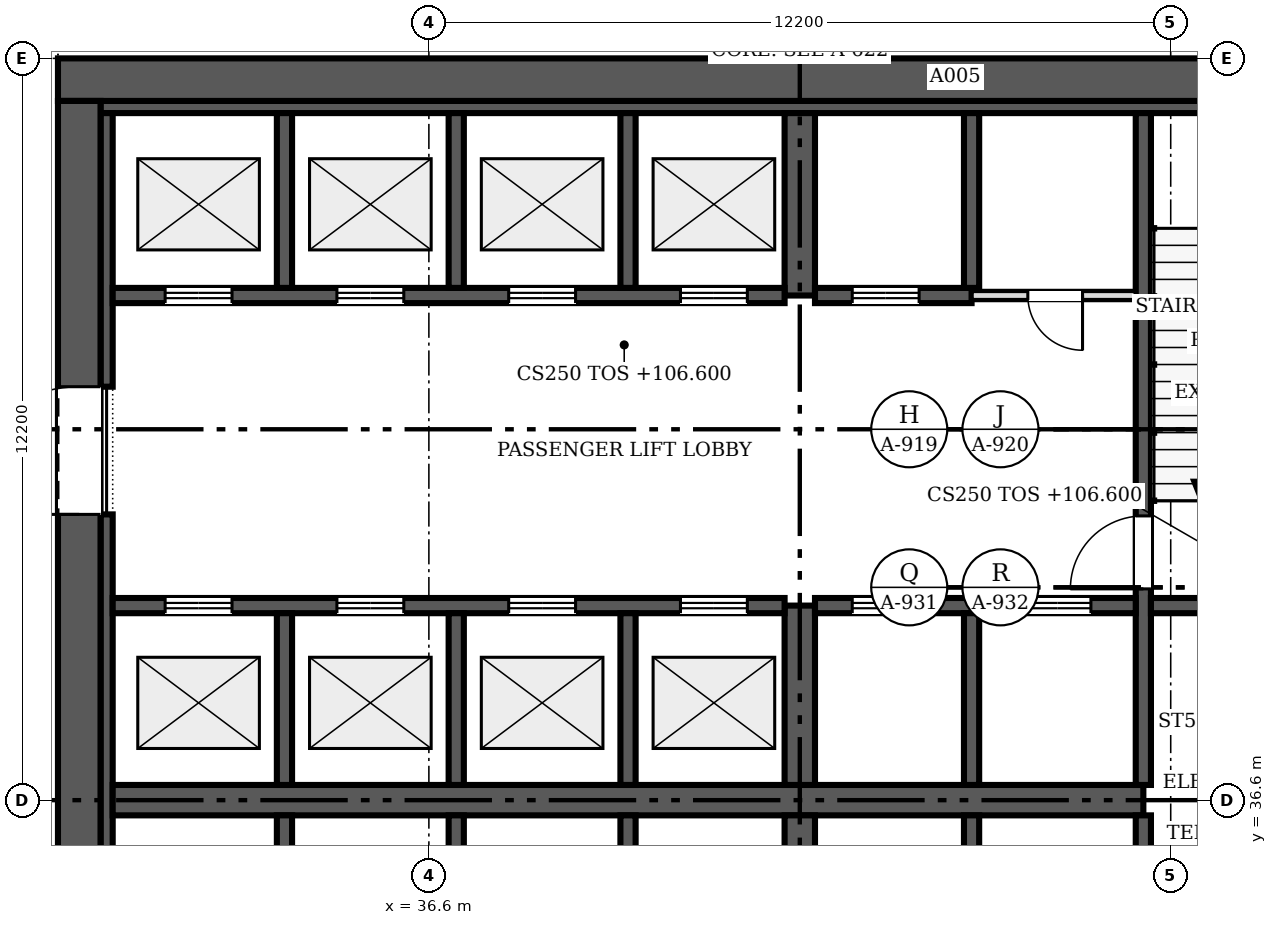
"""IFC4 building model, lengths in metres.
Left out: names, types, materials, properties, quantities, classifications, styles, units other than length and angle.
Written with IfcOpenShell. Run it as: python <this file> out.ifc"""

import sys

from ifc_helpers import new_model, si_unit, direction, frame, frame_2d, origin, place, context, subcontext, project, spatial, rectangle, extrude, source, transform, mapped, element, fill, save


model = new_model("IFC4")
c1 = context("Model", 3, precision=1e-05, world=origin(), true_north=direction((0.0, 1.0)))
c2 = subcontext(c1, "Body", "Model", "MODEL_VIEW")
j1 = project(units=[si_unit("LENGTHUNIT", "METRE"), si_unit("PLANEANGLEUNIT", "RADIAN")], contexts=[c1])
p1 = place(None, origin())
s1 = spatial("IfcSite", under=j1, at=p1, CompositionType="ELEMENT")
p2 = place(p1, origin())
s2 = spatial("IfcBuilding", under=s1, at=p2, CompositionType="ELEMENT")
p3 = place(p2, frame((0.0, 0.0, 106.6)))
s3 = spatial("IfcBuildingStorey", under=s2, at=p3, CompositionType="ELEMENT", Elevation=106.6)
p4 = place(p3, frame((30.85, 25.1, 0.0), z_axis=(0.0, 0.0, 1.0), x_axis=(0.0, 1.0, 0.0)))
e1 = element("IfcWall", 1, at=p4, inside=s3, PredefinedType="SHEAR", context=c2, shape_type="SweptSolid", body=[
    extrude(rectangle(XDim=23.0, YDim=0.7, at=frame_2d((11.5, 0.0))), origin(), (0.0, 0.0, 1.0), 6.0),
])
m1 = source(origin(), c2, "Body", "SweptSolid", [
    extrude(rectangle(XDim=2.1, YDim=2.4, at=frame_2d((1.05, 1.2))), frame((0.0, 0.36, 0.0), z_axis=(0.0, -1.0, 0.0), x_axis=(1.0, 0.0, 0.0)), (0.0, 0.0, 1.0), 0.72),
])
p5 = place(p4, frame((4.7, 0.0, 0.0)))
e2 = element("IfcOpeningElement", 2, at=p5, cuts=e1, PredefinedType="OPENING", context=c2, shape_type="MappedRepresentation", body=[
    mapped(m1, transform((0.0, 0.0, 0.0), scale=1.0)),
])
p6 = place(p4, frame((16.2, 0.0, 0.0)))
e3 = element("IfcOpeningElement", 3, at=p6, cuts=e1, PredefinedType="OPENING", context=c2, shape_type="MappedRepresentation", body=[
    mapped(m1, transform((0.0, 0.0, 0.0), scale=1.0)),
])
p7 = place(p3, frame((30.5, 48.45, 0.0), z_axis=(0.0, 0.0, 1.0), x_axis=(1.0, 0.0, 0.0)))
e4 = element("IfcWall", 4, at=p7, inside=s3, PredefinedType="SHEAR", context=c2, shape_type="SweptSolid", body=[
    extrude(rectangle(XDim=24.4, YDim=0.7, at=frame_2d((12.2, 0.0))), origin(), (0.0, 0.0, 1.0), 6.0),
])
p8 = place(p3, frame((31.2, 48.0, 0.0), z_axis=(0.0, 0.0, 1.0), x_axis=(1.0, 0.0, 0.0)))
e5 = element("IfcWall", 5, at=p8, inside=s3, PredefinedType="SOLIDWALL", context=c2, shape_type="SweptSolid", body=[
    extrude(rectangle(XDim=23.0, YDim=0.2, at=frame_2d((11.5, 0.0))), origin(), (0.0, 0.0, 1.0), 6.0),
])
p9 = place(p3, frame((31.3, 31.9, 0.0), z_axis=(0.0, 0.0, 1.0), x_axis=(0.0, 1.0, 0.0)))
e6 = element("IfcWall", 6, at=p9, inside=s3, PredefinedType="SOLIDWALL", context=c2, shape_type="SweptSolid", body=[
    extrude(rectangle(XDim=9.4, YDim=0.2, at=frame_2d((4.7, 0.0))), origin(), (0.0, 0.0, 1.0), 6.0),
])
p10 = place(p3, frame((31.3, 43.4, 0.0), z_axis=(0.0, 0.0, 1.0), x_axis=(0.0, 1.0, 0.0)))
e7 = element("IfcWall", 7, at=p10, inside=s3, PredefinedType="SOLIDWALL", context=c2, shape_type="SweptSolid", body=[
    extrude(rectangle(XDim=4.5, YDim=0.2, at=frame_2d((2.25, 0.0))), origin(), (0.0, 0.0, 1.0), 6.0),
])
p11 = place(p3, frame((31.4, 36.6, 0.0), z_axis=(0.0, 0.0, 1.0), x_axis=(1.0, 0.0, 0.0)))
e8 = element("IfcWall", 8, at=p11, inside=s3, PredefinedType="SHEAR", context=c2, shape_type="SweptSolid", body=[
    extrude(rectangle(XDim=16.95, YDim=0.5, at=frame_2d((8.475, 0.0))), origin(), (0.0, 0.0, 1.0), 6.0),
])
p12 = place(p3, frame((42.7, 36.35, 0.0), z_axis=(0.0, 0.0, 1.0), x_axis=(0.0, -1.0, 0.0)))
e9 = element("IfcWall", 9, at=p12, inside=s3, PredefinedType="SHEAR", context=c2, shape_type="SweptSolid", body=[
    extrude(rectangle(XDim=11.05, YDim=0.5, at=frame_2d((5.525, 0.0))), origin(), (0.0, 0.0, 1.0), 6.0),
])
m2 = source(origin(), c2, "Body", "SweptSolid", [
    extrude(rectangle(XDim=0.9, YDim=2.1, at=frame_2d((0.45, 1.05))), frame((0.0, 0.26, 0.0), z_axis=(0.0, -1.0, 0.0), x_axis=(1.0, 0.0, 0.0)), (0.0, 0.0, 1.0), 0.52),
])
p13 = place(p12, frame((6.5, 0.0, 0.0)))
e10 = element("IfcOpeningElement", 10, at=p13, cuts=e9, PredefinedType="OPENING", context=c2, shape_type="MappedRepresentation", body=[
    mapped(m2, transform((0.0, 0.0, 0.0), scale=1.0)),
])
m3 = source(origin(), c2, "Body", "SweptSolid", [
    extrude(rectangle(XDim=1.1, YDim=2.1, at=frame_2d((0.55, 1.05))), frame((0.0, 0.26, 0.0), z_axis=(0.0, -1.0, 0.0), x_axis=(1.0, 0.0, 0.0)), (0.0, 0.0, 1.0), 0.52),
])
p14 = place(p12, frame((3.8, 0.0, 0.0)))
e11 = element("IfcOpeningElement", 11, at=p14, cuts=e9, PredefinedType="OPENING", context=c2, shape_type="MappedRepresentation", body=[
    mapped(m3, transform((0.0, 0.0, 0.0), scale=1.0)),
])
p15 = place(p3, frame((42.7, 36.85, 0.0), z_axis=(0.0, 0.0, 1.0), x_axis=(0.0, 1.0, 0.0)))
e12 = element("IfcWall", 12, at=p15, inside=s3, PredefinedType="SHEAR", context=c2, shape_type="SweptSolid", body=[
    extrude(rectangle(XDim=2.95, YDim=0.5, at=frame_2d((1.475, 0.0))), origin(), (0.0, 0.0, 1.0), 6.0),
])
p16 = place(p3, frame((42.7, 44.9, 0.0), z_axis=(0.0, 0.0, 1.0), x_axis=(0.0, 1.0, 0.0)))
e13 = element("IfcWall", 13, at=p16, inside=s3, PredefinedType="SHEAR", context=c2, shape_type="SweptSolid", body=[
    extrude(rectangle(XDim=3.0, YDim=0.5, at=frame_2d((1.5, 0.0))), origin(), (0.0, 0.0, 1.0), 6.0),
])
p17 = place(p3, frame((48.35, 36.35, 0.0), z_axis=(0.0, 0.0, 1.0), x_axis=(0.0, -1.0, 0.0)))
e14 = element("IfcWall", 14, at=p17, inside=s3, PredefinedType="SOLIDWALL", context=c2, shape_type="SweptSolid", body=[
    extrude(rectangle(XDim=11.05, YDim=0.25, at=frame_2d((5.525, 0.0))), origin(), (0.0, 0.0, 1.0), 6.0),
])
m4 = source(origin(), c2, "Body", "SweptSolid", [
    extrude(rectangle(XDim=1.2, YDim=2.1, at=frame_2d((0.6, 1.05))), frame((0.0, 0.135, 0.0), z_axis=(0.0, -1.0, 0.0), x_axis=(1.0, 0.0, 0.0)), (0.0, 0.0, 1.0), 0.27),
])
p18 = place(p17, frame((3.225, 0.0, 0.0)))
e15 = element("IfcOpeningElement", 15, at=p18, cuts=e14, PredefinedType="OPENING", context=c2, shape_type="MappedRepresentation", body=[
    mapped(m4, transform((0.0, 0.0, 0.0), scale=1.0)),
])
p19 = place(p3, frame((48.35, 47.9, 0.0), z_axis=(0.0, 0.0, 1.0), x_axis=(0.0, -1.0, 0.0)))
e16 = element("IfcWall", 16, at=p19, inside=s3, PredefinedType="SOLIDWALL", context=c2, shape_type="SweptSolid", body=[
    extrude(rectangle(XDim=11.05, YDim=0.25, at=frame_2d((5.525, 0.0))), origin(), (0.0, 0.0, 1.0), 6.0),
])
p20 = place(p19, frame((6.625, 0.0, 0.0)))
e17 = element("IfcOpeningElement", 17, at=p20, cuts=e16, PredefinedType="OPENING", context=c2, shape_type="MappedRepresentation", body=[
    mapped(m4, transform((0.0, 0.0, 0.0), scale=1.0)),
])
p21 = place(p3, frame((31.4, 39.8, 0.0), z_axis=(0.0, 0.0, 1.0), x_axis=(1.0, 0.0, 0.0)))
e18 = element("IfcWall", 18, at=p21, inside=s3, PredefinedType="SOLIDWALL", context=c2, shape_type="SweptSolid", body=[
    extrude(rectangle(XDim=11.05, YDim=0.25, at=frame_2d((5.525, 0.0))), origin(), (0.0, 0.0, 1.0), 6.0),
])
m5 = source(origin(), c2, "Body", "SweptSolid", [
    extrude(rectangle(XDim=1.1, YDim=2.1, at=frame_2d((0.55, 1.05))), frame((0.0, 0.135, 0.0), z_axis=(0.0, -1.0, 0.0), x_axis=(1.0, 0.0, 0.0)), (0.0, 0.0, 1.0), 0.27),
])
p22 = place(p21, frame((0.863, 0.0, 0.0)))
e19 = element("IfcOpeningElement", 19, at=p22, cuts=e18, PredefinedType="OPENING", context=c2, shape_type="MappedRepresentation", body=[
    mapped(m5, transform((0.0, 0.0, 0.0), scale=1.0)),
])
p23 = place(p21, frame((3.688, 0.0, 0.0)))
e20 = element("IfcOpeningElement", 20, at=p23, cuts=e18, PredefinedType="OPENING", context=c2, shape_type="MappedRepresentation", body=[
    mapped(m5, transform((0.0, 0.0, 0.0), scale=1.0)),
])
p24 = place(p21, frame((6.512, 0.0, 0.0)))
e21 = element("IfcOpeningElement", 21, at=p24, cuts=e18, PredefinedType="OPENING", context=c2, shape_type="MappedRepresentation", body=[
    mapped(m5, transform((0.0, 0.0, 0.0), scale=1.0)),
])
p25 = place(p21, frame((9.337, 0.0, 0.0)))
e22 = element("IfcOpeningElement", 22, at=p25, cuts=e18, PredefinedType="OPENING", context=c2, shape_type="MappedRepresentation", body=[
    mapped(m5, transform((0.0, 0.0, 0.0), scale=1.0)),
])
p26 = place(p3, frame((42.95, 39.8, 0.0), z_axis=(0.0, 0.0, 1.0), x_axis=(1.0, 0.0, 0.0)))
e23 = element("IfcWall", 23, at=p26, inside=s3, PredefinedType="SOLIDWALL", context=c2, shape_type="SweptSolid", body=[
    extrude(rectangle(XDim=5.275, YDim=0.25, at=frame_2d((2.638, 0.0))), origin(), (0.0, 0.0, 1.0), 6.0),
])
p27 = place(p26, frame((0.613, 0.0, 0.0)))
e24 = element("IfcOpeningElement", 24, at=p27, cuts=e23, PredefinedType="OPENING", context=c2, shape_type="MappedRepresentation", body=[
    mapped(m5, transform((0.0, 0.0, 0.0), scale=1.0)),
])
p28 = place(p26, frame((3.438, 0.0, 0.0)))
e25 = element("IfcOpeningElement", 25, at=p28, cuts=e23, PredefinedType="OPENING", context=c2, shape_type="MappedRepresentation", body=[
    mapped(m5, transform((0.0, 0.0, 0.0), scale=1.0)),
])
p29 = place(p3, frame((48.475, 39.8, 0.0), z_axis=(0.0, 0.0, 1.0), x_axis=(1.0, 0.0, 0.0)))
e26 = element("IfcWall", 26, at=p29, inside=s3, PredefinedType="SOLIDWALL", context=c2, shape_type="SweptSolid", body=[
    extrude(rectangle(XDim=3.525, YDim=0.25, at=frame_2d((1.762, 0.0))), origin(), (0.0, 0.0, 1.0), 6.0),
])
p30 = place(p3, frame((42.45, 44.9, 0.0), z_axis=(0.0, 0.0, 1.0), x_axis=(-1.0, 0.0, 0.0)))
e27 = element("IfcWall", 27, at=p30, inside=s3, PredefinedType="SOLIDWALL", context=c2, shape_type="SweptSolid", body=[
    extrude(rectangle(XDim=11.05, YDim=0.25, at=frame_2d((5.525, 0.0))), origin(), (0.0, 0.0, 1.0), 6.0),
])
p31 = place(p30, frame((9.087, 0.0, 0.0)))
e28 = element("IfcOpeningElement", 28, at=p31, cuts=e27, PredefinedType="OPENING", context=c2, shape_type="MappedRepresentation", body=[
    mapped(m5, transform((0.0, 0.0, 0.0), scale=1.0)),
])
p32 = place(p30, frame((6.262, 0.0, 0.0)))
e29 = element("IfcOpeningElement", 29, at=p32, cuts=e27, PredefinedType="OPENING", context=c2, shape_type="MappedRepresentation", body=[
    mapped(m5, transform((0.0, 0.0, 0.0), scale=1.0)),
])
p33 = place(p30, frame((3.438, 0.0, 0.0)))
e30 = element("IfcOpeningElement", 30, at=p33, cuts=e27, PredefinedType="OPENING", context=c2, shape_type="MappedRepresentation", body=[
    mapped(m5, transform((0.0, 0.0, 0.0), scale=1.0)),
])
p34 = place(p30, frame((0.613, 0.0, 0.0)))
e31 = element("IfcOpeningElement", 31, at=p34, cuts=e27, PredefinedType="OPENING", context=c2, shape_type="MappedRepresentation", body=[
    mapped(m5, transform((0.0, 0.0, 0.0), scale=1.0)),
])
p35 = place(p3, frame((45.525, 44.9, 0.0), z_axis=(0.0, 0.0, 1.0), x_axis=(-1.0, 0.0, 0.0)))
e32 = element("IfcWall", 32, at=p35, inside=s3, PredefinedType="SOLIDWALL", context=c2, shape_type="SweptSolid", body=[
    extrude(rectangle(XDim=2.575, YDim=0.25, at=frame_2d((1.288, 0.0))), origin(), (0.0, 0.0, 1.0), 6.0),
])
p36 = place(p35, frame((0.863, 0.0, 0.0)))
e33 = element("IfcOpeningElement", 33, at=p36, cuts=e32, PredefinedType="OPENING", context=c2, shape_type="MappedRepresentation", body=[
    mapped(m5, transform((0.0, 0.0, 0.0), scale=1.0)),
])
p37 = place(p3, frame((34.225, 33.525, 0.0), z_axis=(0.0, 0.0, 1.0), x_axis=(0.0, 1.0, 0.0)))
e34 = element("IfcWall", 34, at=p37, inside=s3, PredefinedType="SOLIDWALL", context=c2, shape_type="SweptSolid", body=[
    extrude(rectangle(XDim=2.825, YDim=0.25, at=frame_2d((1.413, 0.0))), origin(), (0.0, 0.0, 1.0), 5.8),
])
p38 = place(p3, frame((34.225, 36.85, 0.0), z_axis=(0.0, 0.0, 1.0), x_axis=(0.0, 1.0, 0.0)))
e35 = element("IfcWall", 35, at=p38, inside=s3, PredefinedType="SOLIDWALL", context=c2, shape_type="SweptSolid", body=[
    extrude(rectangle(XDim=2.825, YDim=0.25, at=frame_2d((1.413, 0.0))), origin(), (0.0, 0.0, 1.0), 6.0),
])
p39 = place(p3, frame((37.05, 33.525, 0.0), z_axis=(0.0, 0.0, 1.0), x_axis=(0.0, 1.0, 0.0)))
e36 = element("IfcWall", 36, at=p39, inside=s3, PredefinedType="SOLIDWALL", context=c2, shape_type="SweptSolid", body=[
    extrude(rectangle(XDim=2.825, YDim=0.25, at=frame_2d((1.413, 0.0))), origin(), (0.0, 0.0, 1.0), 5.8),
])
p40 = place(p3, frame((37.05, 36.85, 0.0), z_axis=(0.0, 0.0, 1.0), x_axis=(0.0, 1.0, 0.0)))
e37 = element("IfcWall", 37, at=p40, inside=s3, PredefinedType="SOLIDWALL", context=c2, shape_type="SweptSolid", body=[
    extrude(rectangle(XDim=2.825, YDim=0.25, at=frame_2d((1.413, 0.0))), origin(), (0.0, 0.0, 1.0), 6.0),
])
p41 = place(p3, frame((39.875, 33.525, 0.0), z_axis=(0.0, 0.0, 1.0), x_axis=(0.0, 1.0, 0.0)))
e38 = element("IfcWall", 38, at=p41, inside=s3, PredefinedType="SOLIDWALL", context=c2, shape_type="SweptSolid", body=[
    extrude(rectangle(XDim=2.825, YDim=0.25, at=frame_2d((1.413, 0.0))), origin(), (0.0, 0.0, 1.0), 5.8),
])
p42 = place(p3, frame((39.875, 36.85, 0.0), z_axis=(0.0, 0.0, 1.0), x_axis=(0.0, 1.0, 0.0)))
e39 = element("IfcWall", 39, at=p42, inside=s3, PredefinedType="SOLIDWALL", context=c2, shape_type="SweptSolid", body=[
    extrude(rectangle(XDim=2.825, YDim=0.25, at=frame_2d((1.413, 0.0))), origin(), (0.0, 0.0, 1.0), 6.0),
])
p43 = place(p3, frame((45.525, 33.525, 0.0), z_axis=(0.0, 0.0, 1.0), x_axis=(0.0, 1.0, 0.0)))
e40 = element("IfcWall", 40, at=p43, inside=s3, PredefinedType="SOLIDWALL", context=c2, shape_type="SweptSolid", body=[
    extrude(rectangle(XDim=2.825, YDim=0.25, at=frame_2d((1.413, 0.0))), origin(), (0.0, 0.0, 1.0), 6.0),
])
p44 = place(p3, frame((45.525, 36.85, 0.0), z_axis=(0.0, 0.0, 1.0), x_axis=(0.0, 1.0, 0.0)))
e41 = element("IfcWall", 41, at=p44, inside=s3, PredefinedType="SOLIDWALL", context=c2, shape_type="SweptSolid", body=[
    extrude(rectangle(XDim=2.825, YDim=0.25, at=frame_2d((1.413, 0.0))), origin(), (0.0, 0.0, 1.0), 6.0),
])
for number, where, z_axis, x_axis in (
    (42, (34.225, 45.025, 0.0), (0.0, 0.0, 1.0), (0.0, 1.0, 0.0)),
    (43, (37.05, 45.025, 0.0), (0.0, 0.0, 1.0), (0.0, 1.0, 0.0)),
    (44, (39.875, 45.025, 0.0), (0.0, 0.0, 1.0), (0.0, 1.0, 0.0)),
    (45, (45.525, 45.025, 0.0), (0.0, 0.0, 1.0), (0.0, 1.0, 0.0)),
):
    element("IfcWall", number, at=place(p3, frame(where, z_axis=z_axis, x_axis=x_axis)), inside=s3, PredefinedType="SOLIDWALL", context=c2, shape_type="SweptSolid", body=[
        extrude(rectangle(XDim=2.875, YDim=0.25, at=frame_2d((1.438, 0.0))), origin(), (0.0, 0.0, 1.0), 6.0),
    ])
p45 = place(p3, frame((45.525, 44.9, 0.0), z_axis=(0.0, 0.0, 1.0), x_axis=(1.0, 0.0, 0.0)))
e46 = element("IfcWall", 46, at=p45, inside=s3, PredefinedType="PARTITIONING", context=c2, shape_type="SweptSolid", body=[
    extrude(rectangle(XDim=2.7, YDim=0.15, at=frame_2d((1.35, 0.0))), origin(), (0.0, 0.0, 1.0), 5.8),
])
m6 = source(origin(), c2, "Body", "SweptSolid", [
    extrude(rectangle(XDim=0.9, YDim=2.1, at=frame_2d((0.45, 1.05))), frame((0.0, 0.085, 0.0), z_axis=(0.0, -1.0, 0.0), x_axis=(1.0, 0.0, 0.0)), (0.0, 0.0, 1.0), 0.17),
])
p46 = place(p45, frame((0.925, 0.0, 0.0)))
e47 = element("IfcOpeningElement", 47, at=p46, cuts=e46, PredefinedType="OPENING", context=c2, shape_type="MappedRepresentation", body=[
    mapped(m6, transform((0.0, 0.0, 0.0), scale=1.0)),
])
m7 = source(origin(), c2, "Body", "SweptSolid", [
    extrude(rectangle(XDim=2.1, YDim=2.4, at=frame_2d((1.05, 1.2))), frame((0.0, 0.025, 0.0), z_axis=(0.0, -1.0, 0.0), x_axis=(1.0, 0.0, 0.0)), (0.0, 0.0, 1.0), 0.05),
])
p47 = place(p6, origin())
e48 = element("IfcDoor", 48, at=p47, inside=s3, OperationType="DOUBLE_DOOR_SINGLE_SWING", PredefinedType="DOOR", context=c2, shape_type="MappedRepresentation", body=[
    mapped(m7, transform((0.0, 0.0, 0.0), scale=1.0)),
])
fill(e3, e48)
m8 = source(origin(), c2, "Body", "SweptSolid", [
    extrude(rectangle(XDim=1.2, YDim=2.1, at=frame_2d((0.6, 1.05))), frame((0.0, 0.025, 0.0), z_axis=(0.0, -1.0, 0.0), x_axis=(1.0, 0.0, 0.0)), (0.0, 0.0, 1.0), 0.05),
])
p48 = place(p20, origin())
e49 = element("IfcDoor", 49, at=p48, inside=s3, OperationType="SINGLE_SWING_RIGHT", PredefinedType="DOOR", context=c2, shape_type="MappedRepresentation", body=[
    mapped(m8, transform((0.0, 0.0, 0.0), scale=1.0)),
])
fill(e17, e49)
m9 = source(origin(), c2, "Body", "SweptSolid", [
    extrude(rectangle(XDim=1.1, YDim=2.1, at=frame_2d((0.55, 1.05))), frame((0.0, 0.025, 0.0), z_axis=(0.0, -1.0, 0.0), x_axis=(1.0, 0.0, 0.0)), (0.0, 0.0, 1.0), 0.05),
])
p49 = place(p22, origin())
e50 = element("IfcDoor", 50, at=p49, inside=s3, OperationType="DOUBLE_DOOR_SLIDING", PredefinedType="DOOR", context=c2, shape_type="MappedRepresentation", body=[
    mapped(m9, transform((0.0, 0.0, 0.0), scale=1.0)),
])
fill(e19, e50)
p50 = place(p23, origin())
e51 = element("IfcDoor", 51, at=p50, inside=s3, OperationType="DOUBLE_DOOR_SLIDING", PredefinedType="DOOR", context=c2, shape_type="MappedRepresentation", body=[
    mapped(m9, transform((0.0, 0.0, 0.0), scale=1.0)),
])
fill(e20, e51)
p51 = place(p24, origin())
e52 = element("IfcDoor", 52, at=p51, inside=s3, OperationType="DOUBLE_DOOR_SLIDING", PredefinedType="DOOR", context=c2, shape_type="MappedRepresentation", body=[
    mapped(m9, transform((0.0, 0.0, 0.0), scale=1.0)),
])
fill(e21, e52)
p52 = place(p25, origin())
e53 = element("IfcDoor", 53, at=p52, inside=s3, OperationType="DOUBLE_DOOR_SLIDING", PredefinedType="DOOR", context=c2, shape_type="MappedRepresentation", body=[
    mapped(m9, transform((0.0, 0.0, 0.0), scale=1.0)),
])
fill(e22, e53)
p53 = place(p27, origin())
e54 = element("IfcDoor", 54, at=p53, inside=s3, OperationType="DOUBLE_DOOR_SLIDING", PredefinedType="DOOR", context=c2, shape_type="MappedRepresentation", body=[
    mapped(m9, transform((0.0, 0.0, 0.0), scale=1.0)),
])
fill(e24, e54)
p54 = place(p28, origin())
e55 = element("IfcDoor", 55, at=p54, inside=s3, OperationType="DOUBLE_DOOR_SLIDING", PredefinedType="DOOR", context=c2, shape_type="MappedRepresentation", body=[
    mapped(m9, transform((0.0, 0.0, 0.0), scale=1.0)),
])
fill(e25, e55)
p55 = place(p31, origin())
e56 = element("IfcDoor", 56, at=p55, inside=s3, OperationType="DOUBLE_DOOR_SLIDING", PredefinedType="DOOR", context=c2, shape_type="MappedRepresentation", body=[
    mapped(m9, transform((0.0, 0.0, 0.0), scale=1.0)),
])
fill(e28, e56)
p56 = place(p32, origin())
e57 = element("IfcDoor", 57, at=p56, inside=s3, OperationType="DOUBLE_DOOR_SLIDING", PredefinedType="DOOR", context=c2, shape_type="MappedRepresentation", body=[
    mapped(m9, transform((0.0, 0.0, 0.0), scale=1.0)),
])
fill(e29, e57)
p57 = place(p33, origin())
e58 = element("IfcDoor", 58, at=p57, inside=s3, OperationType="DOUBLE_DOOR_SLIDING", PredefinedType="DOOR", context=c2, shape_type="MappedRepresentation", body=[
    mapped(m9, transform((0.0, 0.0, 0.0), scale=1.0)),
])
fill(e30, e58)
p58 = place(p34, origin())
e59 = element("IfcDoor", 59, at=p58, inside=s3, OperationType="DOUBLE_DOOR_SLIDING", PredefinedType="DOOR", context=c2, shape_type="MappedRepresentation", body=[
    mapped(m9, transform((0.0, 0.0, 0.0), scale=1.0)),
])
fill(e31, e59)
p59 = place(p36, origin())
e60 = element("IfcDoor", 60, at=p59, inside=s3, OperationType="DOUBLE_DOOR_SLIDING", PredefinedType="DOOR", context=c2, shape_type="MappedRepresentation", body=[
    mapped(m9, transform((0.0, 0.0, 0.0), scale=1.0)),
])
fill(e33, e60)
m10 = source(origin(), c2, "Body", "SweptSolid", [
    extrude(rectangle(XDim=0.9, YDim=2.1, at=frame_2d((0.45, 1.05))), frame((0.0, 0.025, 0.0), z_axis=(0.0, -1.0, 0.0), x_axis=(1.0, 0.0, 0.0)), (0.0, 0.0, 1.0), 0.05),
])
p60 = place(p46, origin())
e61 = element("IfcDoor", 61, at=p60, inside=s3, OperationType="SINGLE_SWING_RIGHT", PredefinedType="DOOR", context=c2, shape_type="MappedRepresentation", body=[
    mapped(m10, transform((0.0, 0.0, 0.0), scale=1.0)),
])
fill(e47, e61)
save(model, sys.argv[1])
